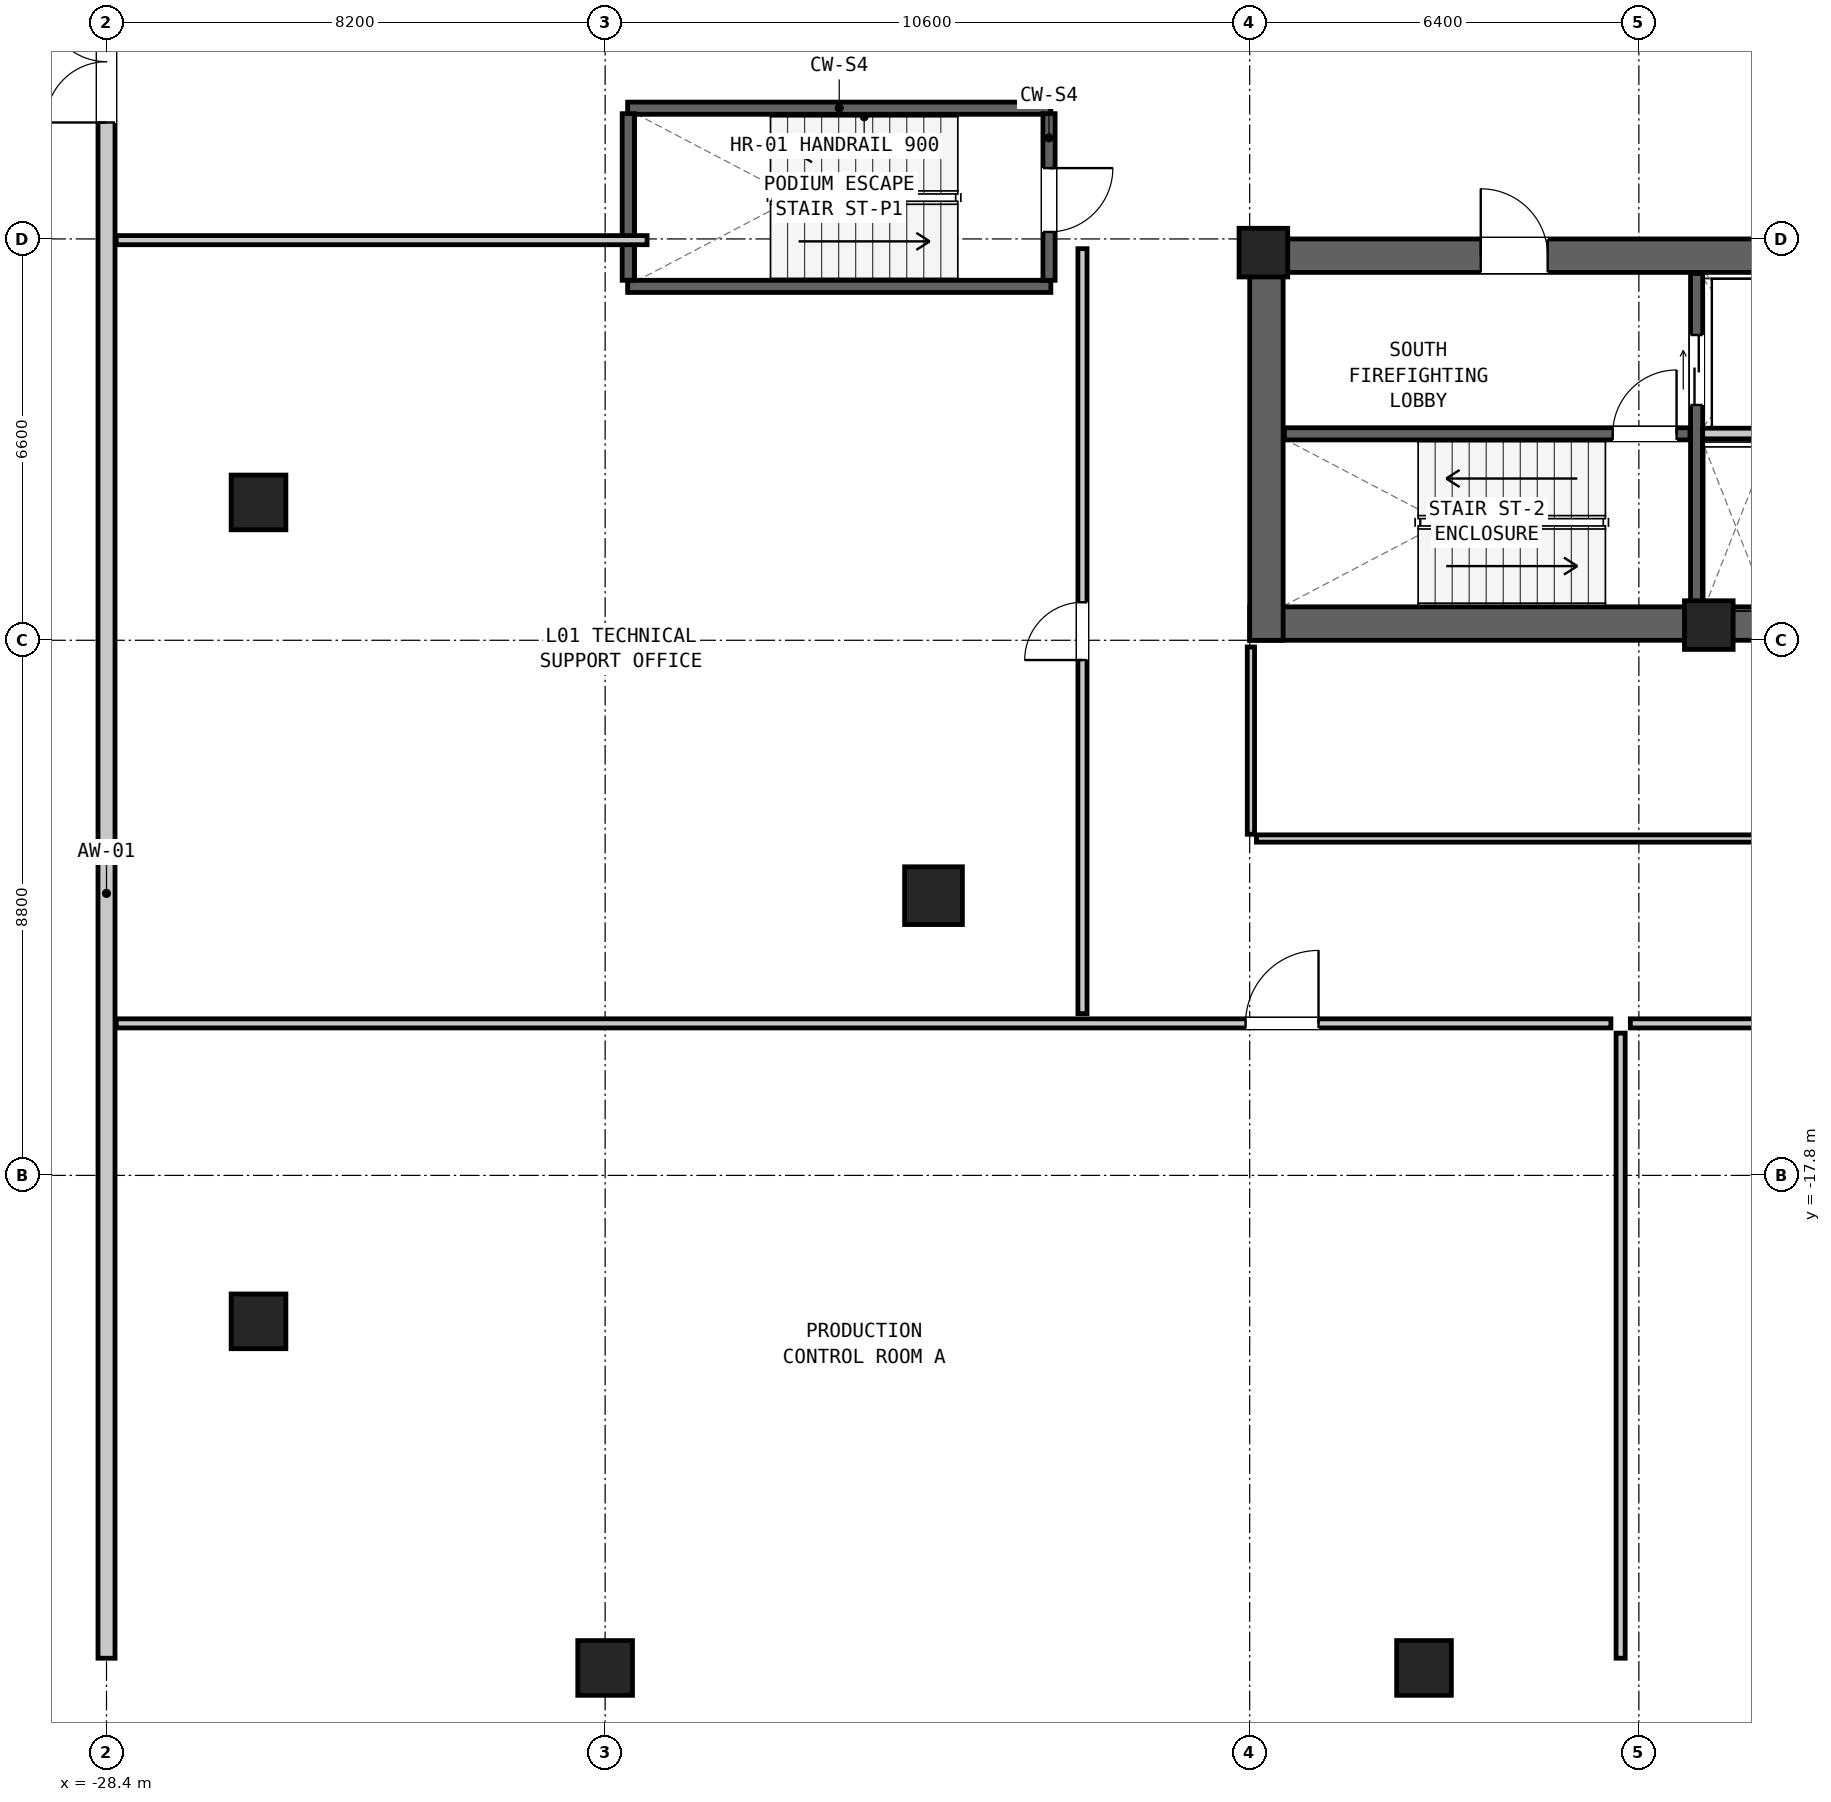
"""IFC4 building model, lengths in metres.
Left out: names, types, materials, properties, quantities, classifications, styles, units other than length and angle.
Written with IfcOpenShell. Run it as: python <this file> out.ifc"""

import sys

from ifc_helpers import new_model, si_unit, direction, frame, frame_2d, origin, origin_2d, place, context, subcontext, project, spatial, rectangle, hollow_rectangle, extrude, element, fill, save


model = new_model("IFC4")
c1 = context("Model", 3, precision=1e-05, world=origin(), true_north=direction((0.0, 1.0)))
c2 = subcontext(c1, "Body", "Model", "MODEL_VIEW")
j1 = project(units=[si_unit("LENGTHUNIT", "METRE"), si_unit("PLANEANGLEUNIT", "RADIAN")], contexts=[c1])
p1 = place(None, origin())
s1 = spatial("IfcSite", under=j1, at=p1, CompositionType="ELEMENT")
p2 = place(p1, origin())
s2 = spatial("IfcBuilding", under=s1, at=p2, CompositionType="ELEMENT")
p3 = place(p2, frame((0.0, 0.0, 5.1)))
s3 = spatial("IfcBuildingStorey", under=s2, at=p3, CompositionType="ELEMENT", Elevation=5.1)
p4 = place(p3, frame((-9.6, -8.725, 0.0), z_axis=(0.0, 0.0, 1.0), x_axis=(1.0, 0.0, 0.0)))
e1 = element("IfcWall", 1, at=p4, inside=s3, PredefinedType="SHEAR", context=c2, shape_type="SweptSolid", body=[
    extrude(rectangle(XDim=19.2, YDim=0.55, at=frame_2d((9.6, 0.0))), origin(), (0.0, 0.0, 1.0), 4.2),
])
p5 = place(p3, frame((-9.6, -2.675, 0.0), z_axis=(0.0, 0.0, 1.0), x_axis=(1.0, 0.0, 0.0)))
e2 = element("IfcWall", 2, at=p5, inside=s3, PredefinedType="SHEAR", context=c2, shape_type="SweptSolid", body=[
    extrude(rectangle(XDim=19.2, YDim=0.55, at=frame_2d((9.6, 0.0))), origin(), (0.0, 0.0, 1.0), 4.2),
])
p6 = place(p5, frame((3.8, 0.0, 0.0)))
e3 = element("IfcOpeningElement", 3, at=p6, cuts=e2, PredefinedType="OPENING", context=c2, shape_type="SweptSolid", body=[
    extrude(rectangle(XDim=1.1, YDim=2.08, at=frame_2d((0.55, 1.04))), frame((0.0, 0.287, 0.0), z_axis=(0.0, -1.0, 0.0), x_axis=(1.0, 0.0, 0.0)), (0.0, 0.0, 1.0), 0.574),
])
p7 = place(p5, frame((12.2, 0.0, 0.0)))
e4 = element("IfcOpeningElement", 4, at=p7, cuts=e2, PredefinedType="OPENING", context=c2, shape_type="SweptSolid", body=[
    extrude(rectangle(XDim=1.6, YDim=2.12, at=frame_2d((0.8, 1.06))), frame((0.0, 0.287, 0.0), z_axis=(0.0, -1.0, 0.0), x_axis=(1.0, 0.0, 0.0)), (0.0, 0.0, 1.0), 0.574),
])
p8 = place(p5, frame((16.5, 0.0, 0.0)))
e5 = element("IfcOpeningElement", 5, at=p8, cuts=e2, PredefinedType="OPENING", context=c2, shape_type="SweptSolid", body=[
    extrude(rectangle(XDim=0.9, YDim=2.05, at=frame_2d((0.45, 1.025))), frame((0.0, 0.287, 0.0), z_axis=(0.0, -1.0, 0.0), x_axis=(1.0, 0.0, 0.0)), (0.0, 0.0, 1.0), 0.574),
])
p9 = place(p3, frame((-9.325, -9.0, 0.0), z_axis=(0.0, 0.0, 1.0), x_axis=(0.0, 1.0, 0.0)))
e6 = element("IfcWall", 6, at=p9, inside=s3, PredefinedType="SHEAR", context=c2, shape_type="SweptSolid", body=[
    extrude(rectangle(XDim=6.6, YDim=0.55, at=frame_2d((3.3, 0.0))), origin(), (0.0, 0.0, 1.0), 4.2),
])
p10 = place(p3, frame((-14.8, -13.2, 0.0), z_axis=(0.0, 0.0, 1.0), x_axis=(1.0, 0.0, 0.0)))
e7 = element("IfcColumn", 7, at=p10, inside=s3, PredefinedType="COLUMN", context=c2, shape_type="SweptSolid", body=[
    extrude(hollow_rectangle(XDim=0.95, YDim=0.95, WallThickness=0.06, at=origin_2d()), origin(), (0.0, 0.0, 1.0), 4.2),
])
for number, where, z_axis, x_axis in (
    (8, (-20.2, -25.9, 0.0), (0.0, 0.0, 1.0), (1.0, 0.0, 0.0)),
    (9, (-6.733, -25.9, 0.0), (0.0, 0.0, 1.0), (1.0, 0.0, 0.0)),
    (10, (-25.9, -6.733, 0.0), (0.0, 0.0, 1.0), (0.0, 1.0, 0.0)),
    (11, (-25.9, -20.2, 0.0), (0.0, 0.0, 1.0), (0.0, 1.0, 0.0)),
):
    element("IfcColumn", number, at=place(p3, frame(where, z_axis=z_axis, x_axis=x_axis)), inside=s3, PredefinedType="COLUMN", context=c2, shape_type="SweptSolid", body=[
        extrude(hollow_rectangle(XDim=0.9, YDim=0.9, WallThickness=0.055, at=origin_2d()), origin(), (0.0, 0.0, 1.0), 4.2),
    ])
for number, where, z_axis, x_axis in (
    (12, (-9.375, -2.625, 0.0), (0.0, 0.0, 1.0), (1.0, 0.0, 0.0)),
    (13, (-2.05, -8.75, 0.0), (0.0, 0.0, 1.0), (1.0, 0.0, 0.0)),
):
    element("IfcColumn", number, at=place(p3, frame(where, z_axis=z_axis, x_axis=x_axis)), inside=s3, PredefinedType="COLUMN", context=c2, shape_type="SweptSolid", body=[
        extrude(rectangle(XDim=0.8, YDim=0.8, at=origin_2d()), origin(), (0.0, 0.0, 1.0), 4.2),
    ])
p11 = place(p3, frame((-9.03, -5.605, 0.0), z_axis=(0.0, 0.0, 1.0), x_axis=(1.0, 0.0, 0.0)))
e14 = element("IfcWall", 14, at=p11, inside=s3, PredefinedType="SHEAR", context=c2, shape_type="SweptSolid", body=[
    extrude(rectangle(XDim=6.67, YDim=0.2, at=frame_2d((3.335, 0.0))), origin(), (0.0, 0.0, 1.0), 3.88),
])
p12 = place(p11, frame((5.4, 0.0, 0.0)))
e15 = element("IfcOpeningElement", 15, at=p12, cuts=e14, PredefinedType="OPENING", context=c2, shape_type="SweptSolid", body=[
    extrude(rectangle(XDim=1.05, YDim=2.08, at=frame_2d((0.525, 1.04))), frame((0.0, 0.112, 0.0), z_axis=(0.0, -1.0, 0.0), x_axis=(1.0, 0.0, 0.0)), (0.0, 0.0, 1.0), 0.224),
])
p13 = place(p3, frame((-2.25, -8.43, 0.0), z_axis=(0.0, 0.0, 1.0), x_axis=(0.0, 1.0, 0.0)))
e16 = element("IfcWall", 16, at=p13, inside=s3, PredefinedType="SHEAR", context=c2, shape_type="SweptSolid", body=[
    extrude(rectangle(XDim=5.46, YDim=0.2, at=frame_2d((2.73, 0.0))), origin(), (0.0, 0.0, 1.0), 3.88),
])
p14 = place(p13, frame((3.3, 0.0, 0.0)))
e17 = element("IfcOpeningElement", 17, at=p14, cuts=e16, PredefinedType="OPENING", context=c2, shape_type="SweptSolid", body=[
    extrude(rectangle(XDim=1.15, YDim=2.08, at=frame_2d((0.575, 1.04))), frame((0.0, 0.112, 0.0), z_axis=(0.0, -1.0, 0.0), x_axis=(1.0, 0.0, 0.0)), (0.0, 0.0, 1.0), 0.224),
])
p15 = place(p3, frame((-2.15, -5.6, 0.0), z_axis=(0.0, 0.0, 1.0), x_axis=(1.0, 0.0, 0.0)))
e18 = element("IfcWall", 18, at=p15, inside=s3, PredefinedType="PARTITIONING", context=c2, shape_type="SweptSolid", body=[
    extrude(rectangle(XDim=1.97, YDim=0.175, at=frame_2d((0.985, 0.0))), origin(), (0.0, 0.0, 1.0), 3.88),
])
for number, where, z_axis, x_axis in (
    (19, (-19.83, -0.25, 0.0), (0.0, 0.0, 1.0), (1.0, 0.0, 0.0)),
    (20, (-19.83, -3.18, 0.0), (0.0, 0.0, 1.0), (1.0, 0.0, 0.0)),
):
    element("IfcWall", number, at=place(p3, frame(where, z_axis=z_axis, x_axis=x_axis)), inside=s3, PredefinedType="SHEAR", context=c2, shape_type="SweptSolid", body=[
        extrude(rectangle(XDim=6.96, YDim=0.2, at=frame_2d((3.48, 0.0))), origin(), (0.0, 0.0, 1.0), 3.88),
    ])
p16 = place(p3, frame((-12.9, -0.34, 0.0), z_axis=(0.0, 0.0, 1.0), x_axis=(0.0, -1.0, 0.0)))
e21 = element("IfcWall", 21, at=p16, inside=s3, PredefinedType="SHEAR", context=c2, shape_type="SweptSolid", body=[
    extrude(rectangle(XDim=2.74, YDim=0.2, at=frame_2d((1.37, 0.0))), origin(), (0.0, 0.0, 1.0), 3.88),
])
p17 = place(p16, frame((0.895, 0.0, 0.0)))
e22 = element("IfcOpeningElement", 22, at=p17, cuts=e21, PredefinedType="OPENING", context=c2, shape_type="SweptSolid", body=[
    extrude(rectangle(XDim=1.05, YDim=2.08, at=frame_2d((0.525, 1.04))), frame((0.0, 0.112, 0.0), z_axis=(0.0, -1.0, 0.0), x_axis=(1.0, 0.0, 0.0)), (0.0, 0.0, 1.0), 0.224),
])
p18 = place(p3, frame((-19.82, -3.08, 0.0), z_axis=(0.0, 0.0, 1.0), x_axis=(0.0, 1.0, 0.0)))
e23 = element("IfcWall", 23, at=p18, inside=s3, PredefinedType="SHEAR", context=c2, shape_type="SweptSolid", body=[
    extrude(rectangle(XDim=2.74, YDim=0.2, at=frame_2d((1.37, 0.0))), origin(), (0.0, 0.0, 1.0), 3.88),
])
p19 = place(p3, frame((-28.4, -25.74, 0.0), z_axis=(0.0, 0.0, 1.0), x_axis=(0.0, 1.0, 0.0)))
e24 = element("IfcWall", 24, at=p19, inside=s3, PredefinedType="MOVABLE", context=c2, shape_type="SweptSolid", body=[
    extrude(rectangle(XDim=51.48, YDim=0.28, at=frame_2d((25.74, 0.0))), origin(), (0.0, 0.0, 1.0), 3.88),
])
p20 = place(p19, frame((25.255, 0.0, 0.0)))
e25 = element("IfcOpeningElement", 25, at=p20, cuts=e24, PredefinedType="OPENING", context=c2, shape_type="SweptSolid", body=[
    extrude(rectangle(XDim=2.0, YDim=2.14, at=frame_2d((1.0, 1.07))), frame((0.0, 0.152, 0.0), z_axis=(0.0, -1.0, 0.0), x_axis=(1.0, 0.0, 0.0)), (0.0, 0.0, 1.0), 0.304),
])
p21 = place(p3, frame((-28.24, -15.3, 0.0), z_axis=(0.0, 0.0, 1.0), x_axis=(1.0, 0.0, 0.0)))
e26 = element("IfcWall", 26, at=p21, inside=s3, PredefinedType="PARTITIONING", context=c2, shape_type="SweptSolid", body=[
    extrude(rectangle(XDim=24.58, YDim=0.15, at=frame_2d((12.29, 0.0))), origin(), (0.0, 0.0, 1.0), 3.88),
])
p22 = place(p21, frame((18.572, 0.0, 0.0)))
e27 = element("IfcOpeningElement", 27, at=p22, cuts=e26, PredefinedType="OPENING", context=c2, shape_type="SweptSolid", body=[
    extrude(rectangle(XDim=1.2, YDim=2.1, at=frame_2d((0.6, 1.05))), frame((0.0, 0.087, 0.0), z_axis=(0.0, -1.0, 0.0), x_axis=(1.0, 0.0, 0.0)), (0.0, 0.0, 1.0), 0.174),
])
p23 = place(p3, frame((-3.34, -15.3, 0.0), z_axis=(0.0, 0.0, 1.0), x_axis=(1.0, 0.0, 0.0)))
e28 = element("IfcWall", 28, at=p23, inside=s3, PredefinedType="PARTITIONING", context=c2, shape_type="SweptSolid", body=[
    extrude(rectangle(XDim=23.58, YDim=0.15, at=frame_2d((11.79, 0.0))), origin(), (0.0, 0.0, 1.0), 3.88),
])
p24 = place(p23, frame((5.295, 0.0, 0.0)))
e29 = element("IfcOpeningElement", 29, at=p24, cuts=e28, PredefinedType="OPENING", context=c2, shape_type="SweptSolid", body=[
    extrude(rectangle(XDim=1.2, YDim=2.1, at=frame_2d((0.6, 1.05))), frame((0.0, 0.087, 0.0), z_axis=(0.0, -1.0, 0.0), x_axis=(1.0, 0.0, 0.0)), (0.0, 0.0, 1.0), 0.174),
])
p25 = place(p3, frame((-3.5, -25.74, 0.0), z_axis=(0.0, 0.0, 1.0), x_axis=(0.0, 1.0, 0.0)))
e30 = element("IfcWall", 30, at=p25, inside=s3, PredefinedType="PARTITIONING", context=c2, shape_type="SweptSolid", body=[
    extrude(rectangle(XDim=10.28, YDim=0.15, at=frame_2d((5.14, 0.0))), origin(), (0.0, 0.0, 1.0), 3.88),
])
p26 = place(p3, frame((-12.35, -15.14, 0.0), z_axis=(0.0, 0.0, 1.0), x_axis=(0.0, 1.0, 0.0)))
e31 = element("IfcWall", 31, at=p26, inside=s3, PredefinedType="PARTITIONING", context=c2, shape_type="SweptSolid", body=[
    extrude(rectangle(XDim=12.58, YDim=0.15, at=frame_2d((6.29, 0.0))), origin(), (0.0, 0.0, 1.0), 3.88),
])
p27 = place(p26, frame((5.815, 0.0, 0.0)))
e32 = element("IfcOpeningElement", 32, at=p27, cuts=e31, PredefinedType="OPENING", context=c2, shape_type="SweptSolid", body=[
    extrude(rectangle(XDim=0.95, YDim=2.1, at=frame_2d((0.475, 1.05))), frame((0.0, 0.087, 0.0), z_axis=(0.0, -1.0, 0.0), x_axis=(1.0, 0.0, 0.0)), (0.0, 0.0, 1.0), 0.174),
])
p28 = place(p3, frame((-28.24, -2.42, 0.0), z_axis=(0.0, 0.0, 1.0), x_axis=(1.0, 0.0, 0.0)))
e33 = element("IfcWall", 33, at=p28, inside=s3, PredefinedType="PARTITIONING", context=c2, shape_type="SweptSolid", body=[
    extrude(rectangle(XDim=8.73, YDim=0.15, at=frame_2d((4.365, 0.0))), origin(), (0.0, 0.0, 1.0), 2.742),
])
p29 = place(p3, frame((-9.49, -12.26, 0.0), z_axis=(0.0, 0.0, 1.0), x_axis=(1.0, 0.0, 0.0)))
e34 = element("IfcWall", 34, at=p29, inside=s3, PredefinedType="PARTITIONING", context=c2, shape_type="SweptSolid", body=[
    extrude(rectangle(XDim=18.98, YDim=0.12, at=frame_2d((9.49, 0.0))), origin(), (0.0, 0.0, 1.0), 3.88),
])
p30 = place(p29, frame((9.015, 0.0, 0.0)))
e35 = element("IfcOpeningElement", 35, at=p30, cuts=e34, PredefinedType="OPENING", context=c2, shape_type="SweptSolid", body=[
    extrude(rectangle(XDim=0.9, YDim=2.05, at=frame_2d((0.45, 1.025))), frame((0.0, 0.072, 0.0), z_axis=(0.0, -1.0, 0.0), x_axis=(1.0, 0.0, 0.0)), (0.0, 0.0, 1.0), 0.144),
])
p31 = place(p3, frame((-9.58, -12.19, 0.0), z_axis=(0.0, 0.0, 1.0), x_axis=(0.0, 1.0, 0.0)))
e36 = element("IfcWall", 36, at=p31, inside=s3, PredefinedType="PARTITIONING", context=c2, shape_type="SweptSolid", body=[
    extrude(rectangle(XDim=3.08, YDim=0.12, at=frame_2d((1.54, 0.0))), origin(), (0.0, 0.0, 1.0), 3.88),
])
p32 = place(p12, origin())
e37 = element("IfcDoor", 37, at=p32, inside=s3, OperationType="SINGLE_SWING_RIGHT", PredefinedType="DOOR", context=c2, shape_type="SweptSolid", body=[
    extrude(rectangle(XDim=1.05, YDim=2.08, at=frame_2d((0.525, 1.04))), frame((0.0, 0.025, 0.0), z_axis=(0.0, -1.0, 0.0), x_axis=(1.0, 0.0, 0.0)), (0.0, 0.0, 1.0), 0.05),
])
fill(e15, e37)
p33 = place(p6, origin())
e38 = element("IfcDoor", 38, at=p33, inside=s3, OperationType="SINGLE_SWING_LEFT", PredefinedType="DOOR", context=c2, shape_type="SweptSolid", body=[
    extrude(rectangle(XDim=1.1, YDim=2.08, at=frame_2d((0.55, 1.04))), frame((0.0, 0.025, 0.0), z_axis=(0.0, -1.0, 0.0), x_axis=(1.0, 0.0, 0.0)), (0.0, 0.0, 1.0), 0.05),
])
fill(e3, e38)
p34 = place(p14, origin())
e39 = element("IfcDoor", 39, at=p34, inside=s3, OperationType="DOUBLE_DOOR_SLIDING", PredefinedType="DOOR", context=c2, shape_type="SweptSolid", body=[
    extrude(rectangle(XDim=1.15, YDim=2.08, at=frame_2d((0.575, 1.04))), frame((0.0, 0.025, 0.0), z_axis=(0.0, -1.0, 0.0), x_axis=(1.0, 0.0, 0.0)), (0.0, 0.0, 1.0), 0.05),
])
fill(e17, e39)
p35 = place(p17, origin())
e40 = element("IfcDoor", 40, at=p35, inside=s3, OperationType="SINGLE_SWING_LEFT", PredefinedType="DOOR", context=c2, shape_type="SweptSolid", body=[
    extrude(rectangle(XDim=1.05, YDim=2.08, at=frame_2d((0.525, 1.04))), frame((0.0, 0.025, 0.0), z_axis=(0.0, -1.0, 0.0), x_axis=(1.0, 0.0, 0.0)), (0.0, 0.0, 1.0), 0.05),
])
fill(e22, e40)
p36 = place(p20, origin())
e41 = element("IfcDoor", 41, at=p36, inside=s3, OperationType="DOUBLE_DOOR_SINGLE_SWING", PredefinedType="DOOR", context=c2, shape_type="SweptSolid", body=[
    extrude(rectangle(XDim=2.0, YDim=2.14, at=frame_2d((1.0, 1.07))), frame((0.0, 0.025, 0.0), z_axis=(0.0, -1.0, 0.0), x_axis=(1.0, 0.0, 0.0)), (0.0, 0.0, 1.0), 0.05),
])
fill(e25, e41)
p37 = place(p22, origin())
e42 = element("IfcDoor", 42, at=p37, inside=s3, OperationType="SINGLE_SWING_RIGHT", PredefinedType="DOOR", context=c2, shape_type="SweptSolid", body=[
    extrude(rectangle(XDim=1.2, YDim=2.1, at=frame_2d((0.6, 1.05))), frame((0.0, 0.025, 0.0), z_axis=(0.0, -1.0, 0.0), x_axis=(1.0, 0.0, 0.0)), (0.0, 0.0, 1.0), 0.05),
])
fill(e27, e42)
p38 = place(p27, origin())
e43 = element("IfcDoor", 43, at=p38, inside=s3, OperationType="SINGLE_SWING_LEFT", PredefinedType="DOOR", context=c2, shape_type="SweptSolid", body=[
    extrude(rectangle(XDim=0.95, YDim=2.1, at=frame_2d((0.475, 1.05))), frame((0.0, 0.025, 0.0), z_axis=(0.0, -1.0, 0.0), x_axis=(1.0, 0.0, 0.0)), (0.0, 0.0, 1.0), 0.05),
])
fill(e32, e43)
save(model, sys.argv[1])
